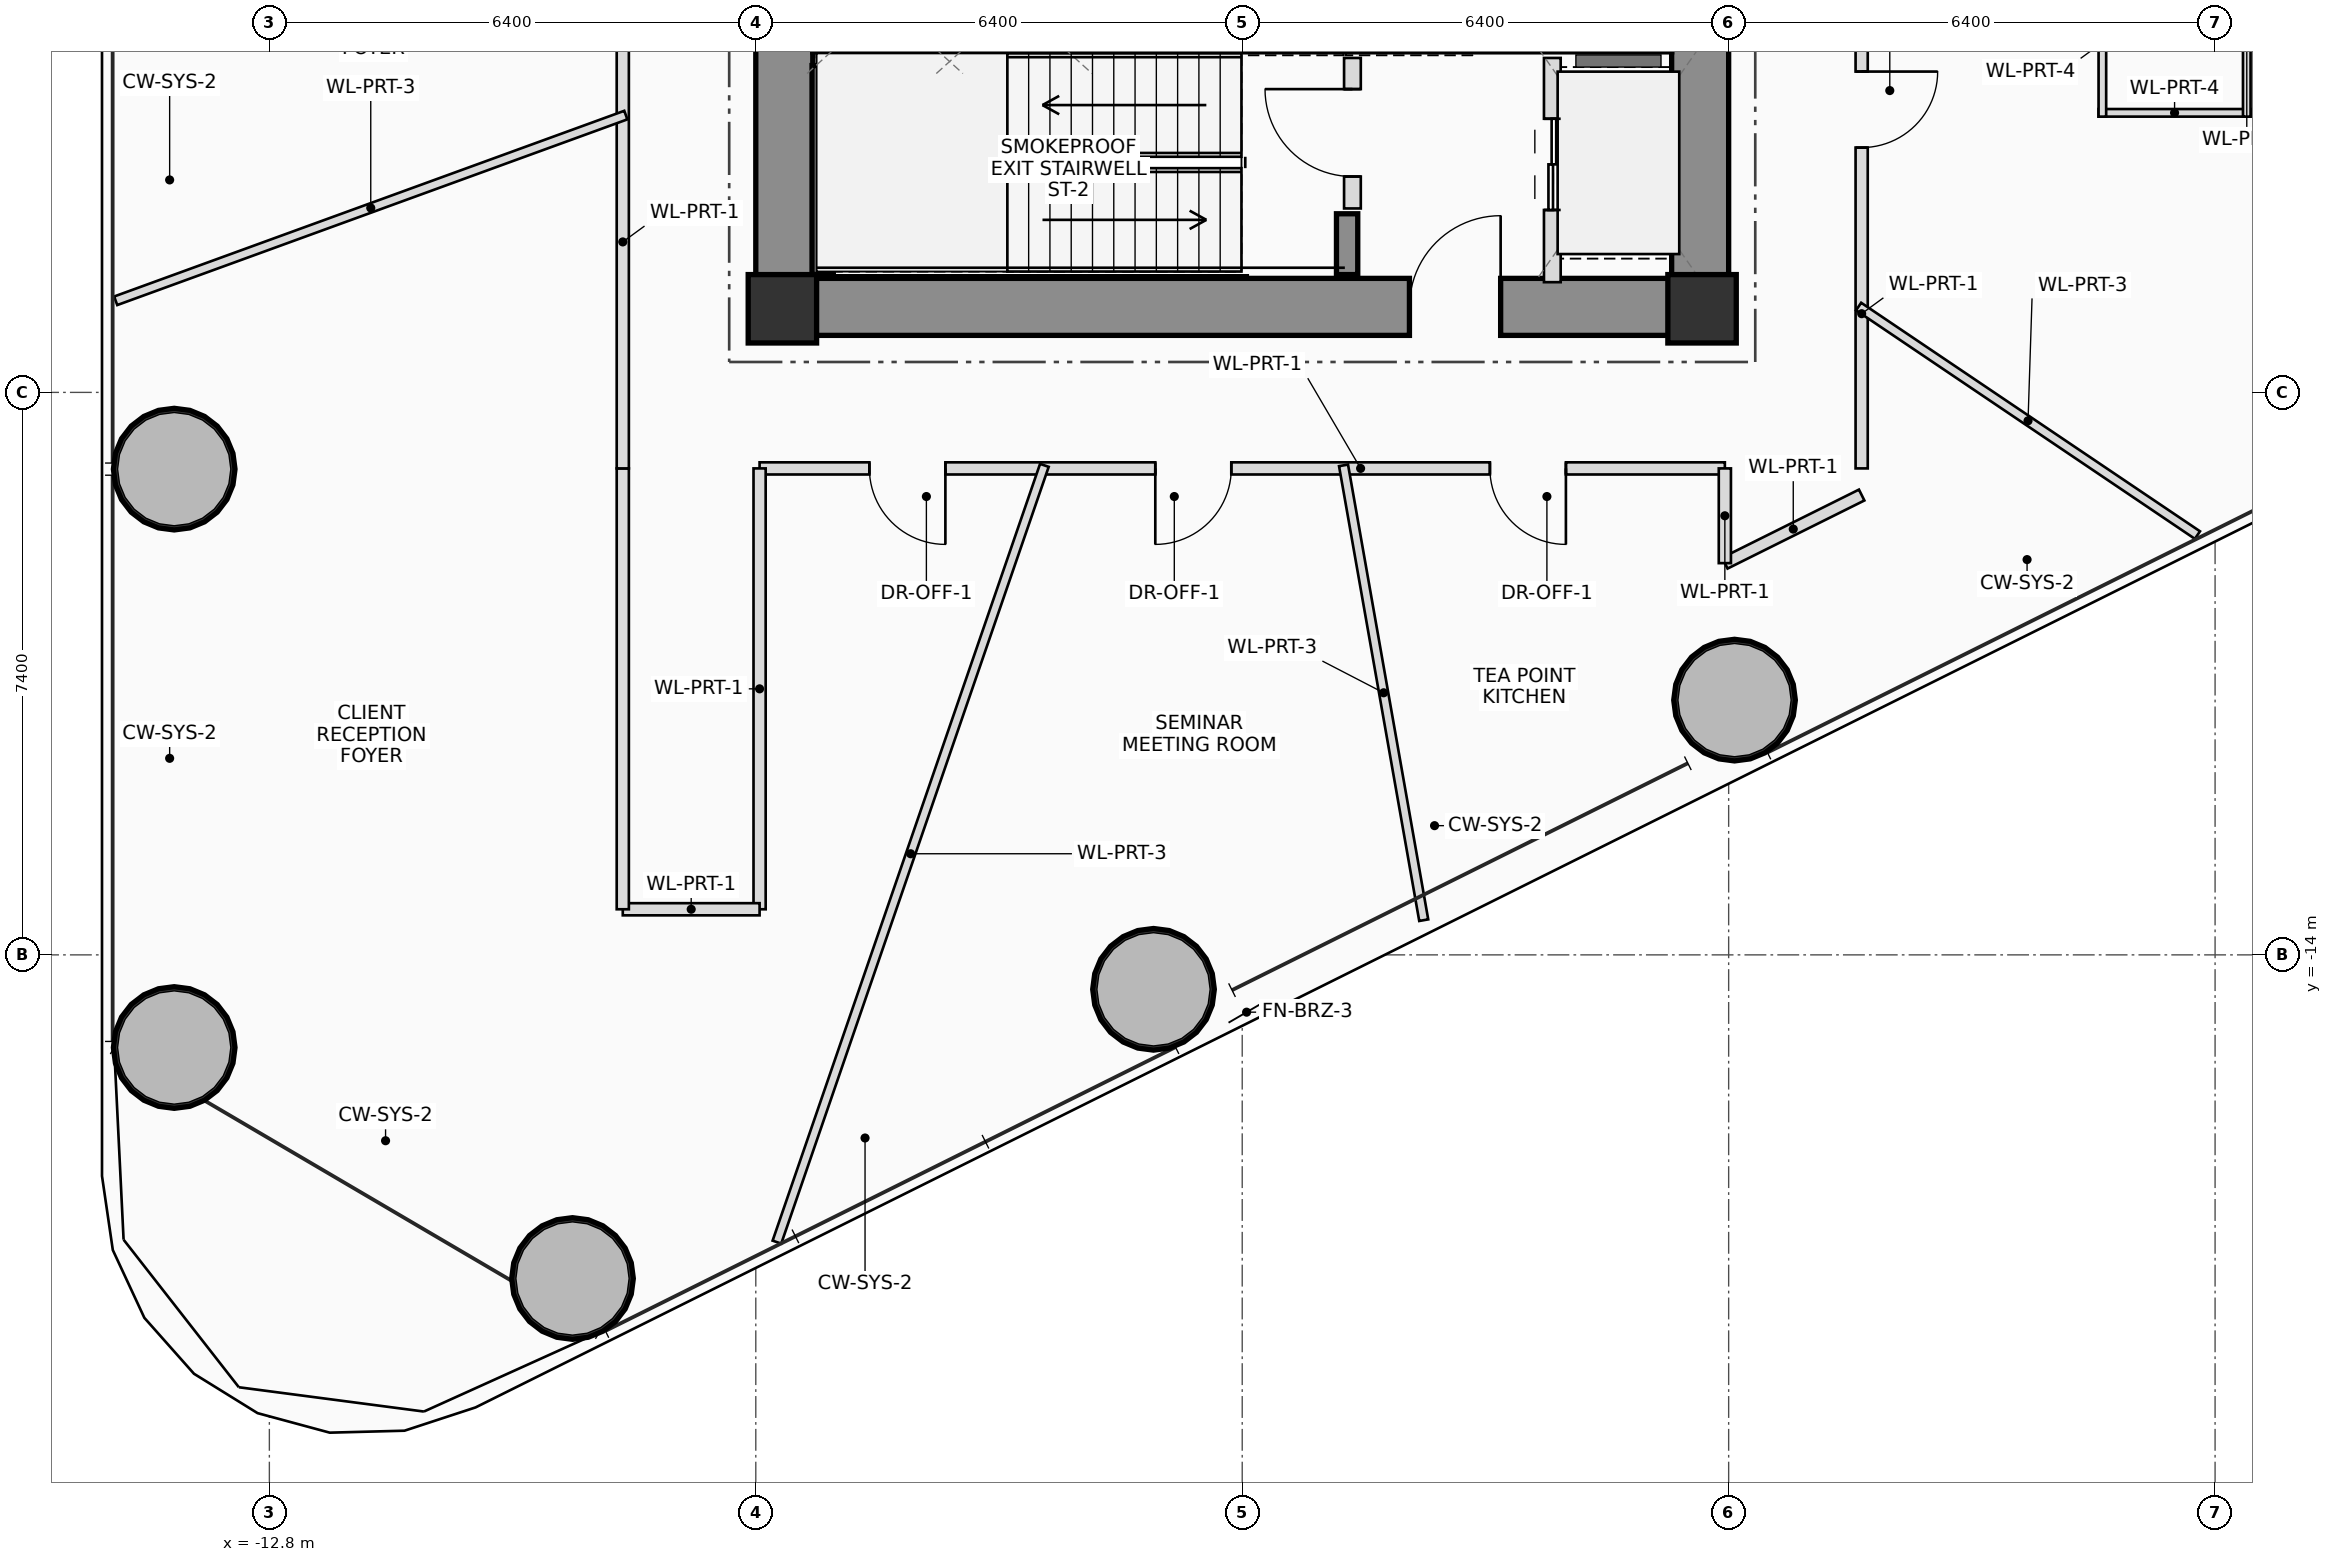
"""IFC4 building model, lengths in metres.
Left out: names, types, materials, properties, quantities, classifications, styles, units other than length and angle.
Written with IfcOpenShell. Run it as: python <this file> out.ifc"""

import sys

from ifc_helpers import new_model, si_unit, direction, frame, frame_2d, origin, origin_2d, place, context, subcontext, project, spatial, rectangle, hollow_circle, extrude, source, transform, mapped, element, fill, save


model = new_model("IFC4")
c1 = context("Model", 3, precision=1e-05, world=origin(), true_north=direction((0.0, 1.0)))
c2 = subcontext(c1, "Body", "Model", "MODEL_VIEW")
j1 = project(units=[si_unit("LENGTHUNIT", "METRE"), si_unit("PLANEANGLEUNIT", "RADIAN")], contexts=[c1])
p1 = place(None, origin())
s1 = spatial("IfcSite", under=j1, at=p1, CompositionType="ELEMENT")
p2 = place(p1, origin())
s2 = spatial("IfcBuilding", under=s1, at=p2, CompositionType="ELEMENT")
p3 = place(p2, frame((0.0, 0.0, 42.3)))
s3 = spatial("IfcBuildingStorey", under=s2, at=p3, CompositionType="ELEMENT", Elevation=42.3)
m1 = source(origin(), c2, "Body", "SweptSolid", [
    extrude(rectangle(XDim=0.9, YDim=0.9, at=origin_2d()), origin(), (0.0, 0.0, 1.0), 3.7),
])
for number, where, z_axis, x_axis in (
    (1, (-6.05, -5.5, 0.0), (0.0, 0.0, 1.0), (1.0, 0.0, 0.0)),
    (2, (6.05, -5.5, 0.0), (0.0, 0.0, 1.0), (1.0, 0.0, 0.0)),
):
    element("IfcColumn", number, at=place(p3, frame(where, z_axis=z_axis, x_axis=x_axis)), inside=s3, PredefinedType="COLUMN", context=c2, shape_type="MappedRepresentation", body=[
        mapped(m1, transform((0.0, 0.0, 0.0), scale=1.0)),
    ])
p4 = place(p3, frame((-6.4, -5.475, 0.0), z_axis=(0.0, 0.0, 1.0), x_axis=(1.0, 0.0, 0.0)))
e3 = element("IfcWall", 3, at=p4, inside=s3, PredefinedType="SHEAR", context=c2, shape_type="SweptSolid", body=[
    extrude(rectangle(XDim=12.8, YDim=0.75, at=frame_2d((6.4, 0.0))), origin(), (0.0, 0.0, 1.0), 3.7),
])
p5 = place(p4, frame((8.6, 0.0, 0.0)))
e4 = element("IfcOpeningElement", 4, at=p5, cuts=e3, PredefinedType="OPENING", context=c2, shape_type="SweptSolid", body=[
    extrude(rectangle(XDim=1.2, YDim=2.2, at=frame_2d((0.6, 1.1))), frame((0.0, 0.385, 0.0), z_axis=(0.0, -1.0, 0.0), x_axis=(1.0, 0.0, 0.0)), (0.0, 0.0, 1.0), 0.77),
])
p6 = place(p3, frame((6.025, -5.1, 0.0), z_axis=(0.0, 0.0, 1.0), x_axis=(0.0, 1.0, 0.0)))
e5 = element("IfcWall", 5, at=p6, inside=s3, PredefinedType="SHEAR", context=c2, shape_type="SweptSolid", body=[
    extrude(rectangle(XDim=10.2, YDim=0.75, at=frame_2d((5.1, 0.0))), origin(), (0.0, 0.0, 1.0), 3.7),
])
p7 = place(p3, frame((-6.025, -5.1, 0.0), z_axis=(0.0, 0.0, 1.0), x_axis=(0.0, 1.0, 0.0)))
e6 = element("IfcWall", 6, at=p7, inside=s3, PredefinedType="SHEAR", context=c2, shape_type="SweptSolid", body=[
    extrude(rectangle(XDim=3.35, YDim=0.75, at=frame_2d((1.675, 0.0))), origin(), (0.0, 0.0, 1.0), 3.7),
])
p8 = place(p3, frame((-5.52, -5.05, 0.0), z_axis=(0.0, 0.0, 1.0), x_axis=(0.0, 1.0, 0.0)))
e7 = element("IfcWall", 7, at=p8, inside=s3, PredefinedType="SHEAR", context=c2, shape_type="SweptSolid", body=[
    extrude(rectangle(XDim=2.75, YDim=0.28, at=frame_2d((1.375, 0.0))), origin(), (0.0, 0.0, 1.0), 3.7),
])
p9 = place(p3, frame((1.38, -5.05, 0.0), z_axis=(0.0, 0.0, 1.0), x_axis=(0.0, 1.0, 0.0)))
e8 = element("IfcWall", 8, at=p9, inside=s3, PredefinedType="SHEAR", context=c2, shape_type="SweptSolid", body=[
    extrude(rectangle(XDim=0.8, YDim=0.28, at=frame_2d((0.4, 0.0))), origin(), (0.0, 0.0, 1.0), 3.7),
])
m2 = source(origin(), c2, "Body", "SweptSolid", [
    extrude(hollow_circle(Radius=0.8, WallThickness=0.055, at=origin_2d()), origin(), (0.0, 0.0, 1.0), 3.7),
])
for number, where, z_axis, x_axis in (
    (9, (-8.812, -18.258, 0.0), (0.0, 0.0, 1.0), (1.0, 0.0, 0.0)),
    (10, (-1.167, -14.453, 0.0), (0.0, 0.0, 1.0), (1.0, 0.0, 0.0)),
    (11, (6.477, -10.648, 0.0), (0.0, 0.0, 1.0), (1.0, 0.0, 0.0)),
    (12, (-14.052, -7.61, 0.0), (0.0, 0.0, 1.0), (1.0, 0.0, 0.0)),
    (13, (-14.052, -15.219, 0.0), (0.0, 0.0, 1.0), (1.0, 0.0, 0.0)),
):
    element("IfcColumn", number, at=place(p3, frame(where, z_axis=z_axis, x_axis=x_axis)), inside=s3, PredefinedType="COLUMN", context=c2, shape_type="MappedRepresentation", body=[
        mapped(m2, transform((0.0, 0.0, 0.0), scale=1.0)),
    ])
p10 = place(p3, frame((1.45, -4.18, 0.0), z_axis=(0.0, 0.0, 1.0), x_axis=(0.0, 1.0, 0.0)))
e14 = element("IfcWall", 14, at=p10, inside=s3, PredefinedType="PLUMBINGWALL", context=c2, shape_type="SweptSolid", body=[
    extrude(rectangle(XDim=1.98, YDim=0.22, at=frame_2d((0.99, 0.0))), origin(), (0.0, 0.0, 1.0), 3.495),
])
p11 = place(p10, frame((0.42, 0.0, 0.0)))
e15 = element("IfcOpeningElement", 15, at=p11, cuts=e14, PredefinedType="OPENING", context=c2, shape_type="SweptSolid", body=[
    extrude(rectangle(XDim=1.15, YDim=2.15, at=frame_2d((0.575, 1.075))), frame((0.0, 0.12, 0.0), z_axis=(0.0, -1.0, 0.0), x_axis=(1.0, 0.0, 0.0)), (0.0, 0.0, 1.0), 0.24),
])
p12 = place(p3, frame((4.08, -5.15, 0.0), z_axis=(0.0, 0.0, 1.0), x_axis=(0.0, 1.0, 0.0)))
e16 = element("IfcWall", 16, at=p12, inside=s3, PredefinedType="PLUMBINGWALL", context=c2, shape_type="SweptSolid", body=[
    extrude(rectangle(XDim=2.95, YDim=0.22, at=frame_2d((1.475, 0.0))), origin(), (0.0, 0.0, 1.0), 3.495),
])
p13 = place(p12, frame((0.95, 0.0, 0.0)))
e17 = element("IfcOpeningElement", 17, at=p13, cuts=e16, PredefinedType="OPENING", context=c2, shape_type="SweptSolid", body=[
    extrude(rectangle(XDim=1.2, YDim=2.25, at=frame_2d((0.6, 1.125))), frame((0.0, 0.12, 0.0), z_axis=(0.0, -1.0, 0.0), x_axis=(1.0, 0.0, 0.0)), (0.0, 0.0, 1.0), 0.24),
])
p14 = place(p3, frame((13.267, -2.922, 0.0), z_axis=(0.0, 0.0, 1.0), x_axis=(-1.0, 0.0, 0.0)))
e18 = element("IfcWall", 18, at=p14, inside=s3, PredefinedType="PARTITIONING", context=c2, shape_type="SweptSolid", body=[
    extrude(rectangle(XDim=2.0, YDim=0.1, at=frame_2d((1.0, 0.0))), origin(), (0.0, 0.0, 1.0), 3.15),
])
for number, where, z_axis, x_axis in (
    (19, (13.217, -1.022, 0.0), (0.0, 0.0, 1.0), (0.0, -1.0, 0.0)),
    (20, (11.317, -2.972, 0.0), (0.0, 0.0, 1.0), (0.0, 1.0, 0.0)),
):
    element("IfcWall", number, at=place(p3, frame(where, z_axis=z_axis, x_axis=x_axis)), inside=s3, PredefinedType="PARTITIONING", context=c2, shape_type="SweptSolid", body=[
        extrude(rectangle(XDim=1.95, YDim=0.1, at=frame_2d((0.975, 0.0))), origin(), (0.0, 0.0, 1.0), 3.495),
    ])
p15 = place(p3, frame((6.35, -7.6, 0.0), z_axis=(0.0, 0.0, 1.0), x_axis=(-1.0, 0.0, 0.0)))
e21 = element("IfcWall", 21, at=p15, inside=s3, PredefinedType="PARTITIONING", context=c2, shape_type="SweptSolid", body=[
    extrude(rectangle(XDim=12.7, YDim=0.16, at=frame_2d((6.35, 0.0))), origin(), (0.0, 0.0, 1.0), 2.8),
])
p16 = place(p15, frame((2.091, 0.0, 0.0)))
e22 = element("IfcOpeningElement", 22, at=p16, cuts=e21, PredefinedType="OPENING", context=c2, shape_type="SweptSolid", body=[
    extrude(rectangle(XDim=1.0, YDim=2.25, at=frame_2d((0.5, 1.125))), frame((0.0, 0.09, 0.0), z_axis=(0.0, -1.0, 0.0), x_axis=(1.0, 0.0, 0.0)), (0.0, 0.0, 1.0), 0.18),
])
p17 = place(p15, frame((6.494, 0.0, 0.0)))
e23 = element("IfcOpeningElement", 23, at=p17, cuts=e21, PredefinedType="OPENING", context=c2, shape_type="SweptSolid", body=[
    extrude(rectangle(XDim=1.0, YDim=2.25, at=frame_2d((0.5, 1.125))), frame((0.0, 0.09, 0.0), z_axis=(0.0, -1.0, 0.0), x_axis=(1.0, 0.0, 0.0)), (0.0, 0.0, 1.0), 0.18),
])
p18 = place(p15, frame((10.256, 0.0, 0.0)))
e24 = element("IfcOpeningElement", 24, at=p18, cuts=e21, PredefinedType="OPENING", context=c2, shape_type="SweptSolid", body=[
    extrude(rectangle(XDim=1.0, YDim=2.25, at=frame_2d((0.5, 1.125))), frame((0.0, 0.09, 0.0), z_axis=(0.0, -1.0, 0.0), x_axis=(1.0, 0.0, 0.0)), (0.0, 0.0, 1.0), 0.18),
])
p19 = place(p3, frame((-6.35, -7.6, 0.0), z_axis=(0.0, 0.0, 1.0), x_axis=(0.0, -1.0, 0.0)))
e25 = element("IfcWall", 25, at=p19, inside=s3, PredefinedType="PARTITIONING", context=c2, shape_type="SweptSolid", body=[
    extrude(rectangle(XDim=5.8, YDim=0.16, at=frame_2d((2.9, 0.0))), origin(), (0.0, 0.0, 1.0), 2.8),
])
p20 = place(p3, frame((-6.35, -13.4, 0.0), z_axis=(0.0, 0.0, 1.0), x_axis=(-1.0, 0.0, 0.0)))
e26 = element("IfcWall", 26, at=p20, inside=s3, PredefinedType="PARTITIONING", context=c2, shape_type="SweptSolid", body=[
    extrude(rectangle(XDim=1.8, YDim=0.16, at=frame_2d((0.9, 0.0))), origin(), (0.0, 0.0, 1.0), 2.8),
])
p21 = place(p3, frame((-8.15, -13.4, 0.0), z_axis=(0.0, 0.0, 1.0), x_axis=(0.0, 1.0, 0.0)))
e27 = element("IfcWall", 27, at=p21, inside=s3, PredefinedType="PARTITIONING", context=c2, shape_type="SweptSolid", body=[
    extrude(rectangle(XDim=5.8, YDim=0.16, at=frame_2d((2.9, 0.0))), origin(), (0.0, 0.0, 1.0), 2.8),
])
p22 = place(p3, frame((-8.15, -7.6, 0.0), z_axis=(0.0, 0.0, 1.0), x_axis=(0.0, 1.0, 0.0)))
e28 = element("IfcWall", 28, at=p22, inside=s3, PredefinedType="PARTITIONING", context=c2, shape_type="SweptSolid", body=[
    extrude(rectangle(XDim=15.2, YDim=0.16, at=frame_2d((7.6, 0.0))), origin(), (0.0, 0.0, 1.0), 2.8),
])
p23 = place(p22, frame((6.109, 0.0, 0.0)))
e29 = element("IfcOpeningElement", 29, at=p23, cuts=e28, PredefinedType="OPENING", context=c2, shape_type="SweptSolid", body=[
    extrude(rectangle(XDim=1.0, YDim=2.25, at=frame_2d((0.5, 1.125))), frame((0.0, 0.09, 0.0), z_axis=(0.0, -1.0, 0.0), x_axis=(1.0, 0.0, 0.0)), (0.0, 0.0, 1.0), 0.18),
])
p24 = place(p22, frame((11.312, 0.0, 0.0)))
e30 = element("IfcOpeningElement", 30, at=p24, cuts=e28, PredefinedType="OPENING", context=c2, shape_type="SweptSolid", body=[
    extrude(rectangle(XDim=1.0, YDim=2.25, at=frame_2d((0.5, 1.125))), frame((0.0, 0.09, 0.0), z_axis=(0.0, -1.0, 0.0), x_axis=(1.0, 0.0, 0.0)), (0.0, 0.0, 1.0), 0.18),
])
p25 = place(p3, frame((8.15, -0.02, 0.0), z_axis=(0.0, 0.0, 1.0), x_axis=(0.0, -1.0, 0.0)))
e31 = element("IfcWall", 31, at=p25, inside=s3, PredefinedType="PARTITIONING", context=c2, shape_type="SweptSolid", body=[
    extrude(rectangle(XDim=7.58, YDim=0.16, at=frame_2d((3.79, 0.0))), origin(), (0.0, 0.0, 1.0), 2.8),
])
p26 = place(p25, frame((2.359, 0.0, 0.0)))
e32 = element("IfcOpeningElement", 32, at=p26, cuts=e31, PredefinedType="OPENING", context=c2, shape_type="SweptSolid", body=[
    extrude(rectangle(XDim=1.0, YDim=2.25, at=frame_2d((0.5, 1.125))), frame((0.0, 0.09, 0.0), z_axis=(0.0, -1.0, 0.0), x_axis=(1.0, 0.0, 0.0)), (0.0, 0.0, 1.0), 0.18),
])
p27 = place(p3, frame((8.15, -7.95, 0.0), z_axis=(0.0, 0.0, 1.0), x_axis=(-0.895251454268, -0.445561256879, 0.0)))
e33 = element("IfcWall", 33, at=p27, inside=s3, PredefinedType="PARTITIONING", context=c2, shape_type="SweptSolid", body=[
    extrude(rectangle(XDim=2.01, YDim=0.16, at=frame_2d((1.005, 0.0))), origin(), (0.0, 0.0, 1.0), 2.8),
])
p28 = place(p3, frame((6.35, -8.846, 0.0), z_axis=(0.0, 0.0, 1.0), x_axis=(0.0, 1.0, 0.0)))
e34 = element("IfcWall", 34, at=p28, inside=s3, PredefinedType="PARTITIONING", context=c2, shape_type="SweptSolid", body=[
    extrude(rectangle(XDim=1.246, YDim=0.16, at=frame_2d((0.623, 0.0))), origin(), (0.0, 0.0, 1.0), 2.8),
])
p29 = place(p3, frame((-8.11, -2.952, 0.0), z_axis=(0.0, 0.0, 1.0), x_axis=(-0.939695583315, -0.342012003734, 0.0)))
e35 = element("IfcWall", 35, at=p29, inside=s3, PredefinedType="PARTITIONING", context=c2, shape_type="SweptSolid", body=[
    extrude(rectangle(XDim=7.143, YDim=0.12, at=frame_2d((3.571, 0.0))), origin(), (0.0, 0.0, 1.0), 2.8),
])
p30 = place(p3, frame((-2.603, -7.56, 0.0), z_axis=(0.0, 0.0, 1.0), x_axis=(-0.325570875914, -0.945517638522, 0.0)))
e36 = element("IfcWall", 36, at=p30, inside=s3, PredefinedType="PARTITIONING", context=c2, shape_type="SweptSolid", body=[
    extrude(rectangle(XDim=10.808, YDim=0.12, at=frame_2d((5.404, 0.0))), origin(), (0.0, 0.0, 1.0), 2.8),
])
p31 = place(p3, frame((1.333, -7.56, 0.0), z_axis=(0.0, 0.0, 1.0), x_axis=(0.173663844644, -0.984804990373, 0.0)))
e37 = element("IfcWall", 37, at=p31, inside=s3, PredefinedType="PARTITIONING", context=c2, shape_type="SweptSolid", body=[
    extrude(rectangle(XDim=6.076, YDim=0.12, at=frame_2d((3.038, 0.0))), origin(), (0.0, 0.0, 1.0), 2.96),
])
p32 = place(p3, frame((8.11, -5.47, 0.0), z_axis=(0.0, 0.0, 1.0), x_axis=(0.829034436431, -0.559197552938, 0.0)))
e38 = element("IfcWall", 38, at=p32, inside=s3, PredefinedType="PARTITIONING", context=c2, shape_type="SweptSolid", body=[
    extrude(rectangle(XDim=5.377, YDim=0.12, at=frame_2d((2.688, 0.0))), origin(), (0.0, 0.0, 1.0), 2.8),
])
p33 = place(p5, origin())
e39 = element("IfcDoor", 39, at=p33, inside=s3, OperationType="SINGLE_SWING_RIGHT", PredefinedType="DOOR", context=c2, shape_type="SweptSolid", body=[
    extrude(rectangle(XDim=1.2, YDim=2.2, at=frame_2d((0.6, 1.1))), frame((0.0, 0.025, 0.0), z_axis=(0.0, -1.0, 0.0), x_axis=(1.0, 0.0, 0.0)), (0.0, 0.0, 1.0), 0.05),
])
fill(e4, e39)
p34 = place(p11, origin())
e40 = element("IfcDoor", 40, at=p34, inside=s3, OperationType="SINGLE_SWING_RIGHT", PredefinedType="DOOR", context=c2, shape_type="SweptSolid", body=[
    extrude(rectangle(XDim=1.15, YDim=2.15, at=frame_2d((0.575, 1.075))), frame((0.0, 0.025, 0.0), z_axis=(0.0, -1.0, 0.0), x_axis=(1.0, 0.0, 0.0)), (0.0, 0.0, 1.0), 0.05),
])
fill(e15, e40)
p35 = place(p13, origin())
e41 = element("IfcDoor", 41, at=p35, inside=s3, OperationType="DOUBLE_DOOR_SLIDING", PredefinedType="DOOR", context=c2, shape_type="SweptSolid", body=[
    extrude(rectangle(XDim=1.2, YDim=2.25, at=frame_2d((0.6, 1.125))), frame((0.0, 0.025, 0.0), z_axis=(0.0, -1.0, 0.0), x_axis=(1.0, 0.0, 0.0)), (0.0, 0.0, 1.0), 0.05),
])
fill(e17, e41)
p36 = place(p16, origin())
e42 = element("IfcDoor", 42, at=p36, inside=s3, OperationType="SINGLE_SWING_LEFT", PredefinedType="DOOR", context=c2, shape_type="SweptSolid", body=[
    extrude(rectangle(XDim=1.0, YDim=2.25, at=frame_2d((0.5, 1.125))), frame((0.0, 0.025, 0.0), z_axis=(0.0, -1.0, 0.0), x_axis=(1.0, 0.0, 0.0)), (0.0, 0.0, 1.0), 0.05),
])
fill(e22, e42)
p37 = place(p17, origin())
e43 = element("IfcDoor", 43, at=p37, inside=s3, OperationType="SINGLE_SWING_RIGHT", PredefinedType="DOOR", context=c2, shape_type="SweptSolid", body=[
    extrude(rectangle(XDim=1.0, YDim=2.25, at=frame_2d((0.5, 1.125))), frame((0.0, 0.025, 0.0), z_axis=(0.0, -1.0, 0.0), x_axis=(1.0, 0.0, 0.0)), (0.0, 0.0, 1.0), 0.05),
])
fill(e23, e43)
p38 = place(p18, origin())
e44 = element("IfcDoor", 44, at=p38, inside=s3, OperationType="SINGLE_SWING_LEFT", PredefinedType="DOOR", context=c2, shape_type="SweptSolid", body=[
    extrude(rectangle(XDim=1.0, YDim=2.25, at=frame_2d((0.5, 1.125))), frame((0.0, 0.025, 0.0), z_axis=(0.0, -1.0, 0.0), x_axis=(1.0, 0.0, 0.0)), (0.0, 0.0, 1.0), 0.05),
])
fill(e24, e44)
p39 = place(p26, origin())
e45 = element("IfcDoor", 45, at=p39, inside=s3, OperationType="SINGLE_SWING_LEFT", PredefinedType="DOOR", context=c2, shape_type="SweptSolid", body=[
    extrude(rectangle(XDim=1.0, YDim=2.25, at=frame_2d((0.5, 1.125))), frame((0.0, 0.025, 0.0), z_axis=(0.0, -1.0, 0.0), x_axis=(1.0, 0.0, 0.0)), (0.0, 0.0, 1.0), 0.05),
])
fill(e32, e45)
save(model, sys.argv[1])
